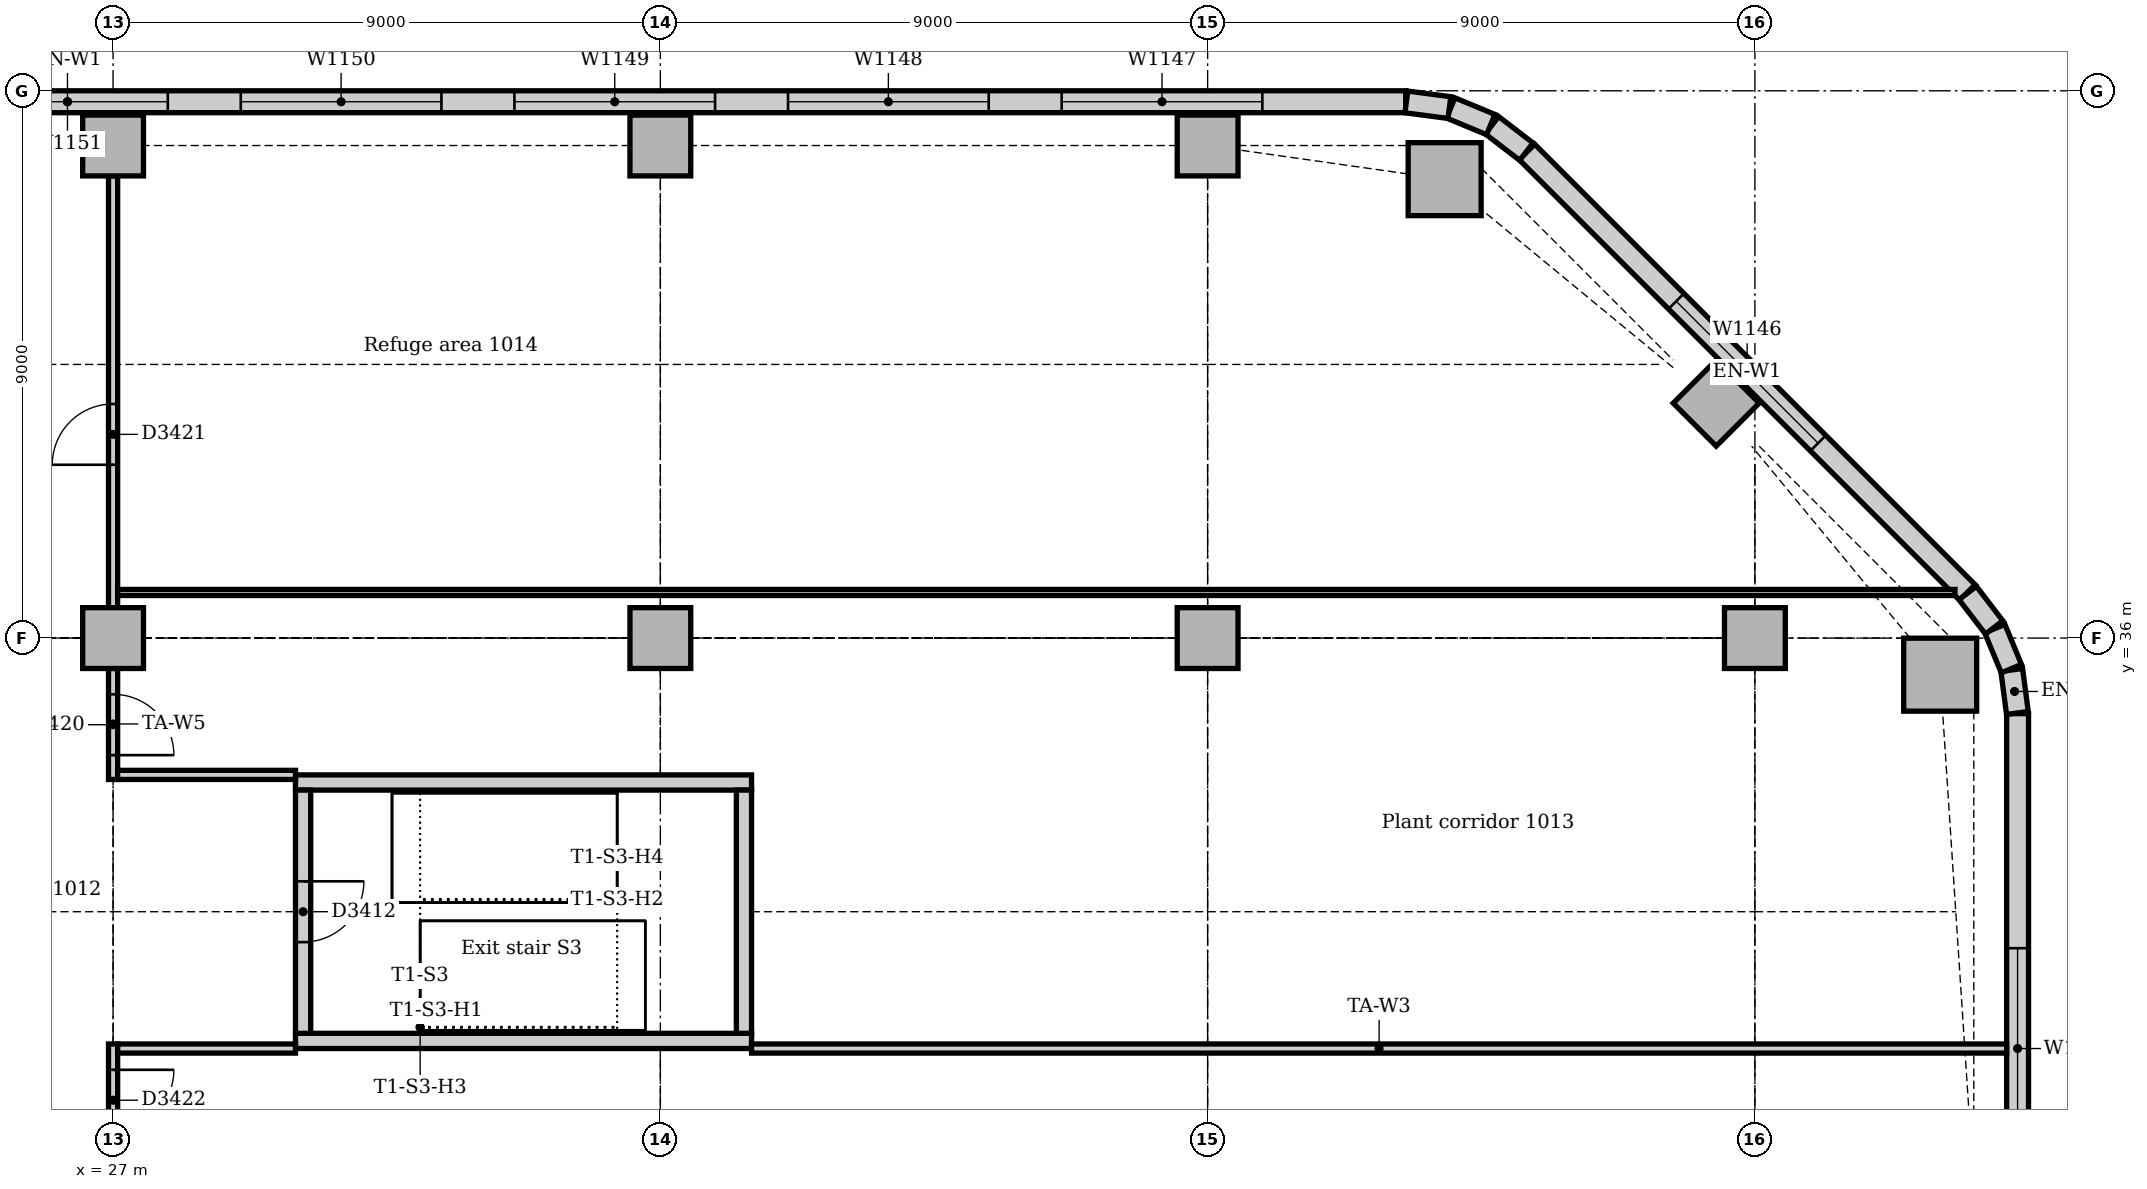
"""IFC4 building model, lengths in metres.
Left out: names, types, materials, properties, quantities, classifications, styles, units other than length and angle.
Written with IfcOpenShell. Run it as: python <this file> out.ifc"""

import sys

from ifc_helpers import new_model, si_unit, direction, frame, frame_2d, origin, origin_2d, place, context, subcontext, project, spatial, rectangle, extrude, element, fill, save


model = new_model("IFC4")
c1 = context("Model", 3, precision=1e-05, world=origin(), true_north=direction((0.0, 1.0)))
c2 = subcontext(c1, "Body", "Model", "MODEL_VIEW")
j1 = project(units=[si_unit("LENGTHUNIT", "METRE"), si_unit("PLANEANGLEUNIT", "RADIAN")], contexts=[c1])
p1 = place(None, origin())
s1 = spatial("IfcSite", under=j1, at=p1, CompositionType="ELEMENT")
p2 = place(p1, origin())
s2 = spatial("IfcBuilding", under=s1, at=p2, CompositionType="ELEMENT")
p3 = place(p2, frame((0.0, 0.0, 46.0)))
s3 = spatial("IfcBuildingStorey", under=s2, at=p3, CompositionType="ELEMENT", Elevation=46.0)
for number, where, z_axis, x_axis in (
    (1, (30.0, 29.375, 0.0), (0.0, 0.0, 1.0), (1.0, 0.0, 0.0)),
    (2, (37.5, 33.625, 0.0), (0.0, 0.0, 1.0), (-1.0, 0.0, 0.0)),
):
    element("IfcWall", number, at=place(p3, frame(where, z_axis=z_axis, x_axis=x_axis)), inside=s3, PredefinedType="SOLIDWALL", context=c2, shape_type="SweptSolid", body=[
        extrude(rectangle(XDim=7.5, YDim=0.25, at=frame_2d((3.75, 0.0))), origin(), (0.0, 0.0, 1.0), 5.0),
    ])
p4 = place(p3, frame((37.375, 29.5, 0.0), z_axis=(0.0, 0.0, 1.0), x_axis=(0.0, 1.0, 0.0)))
e3 = element("IfcWall", 3, at=p4, inside=s3, PredefinedType="SOLIDWALL", context=c2, shape_type="SweptSolid", body=[
    extrude(rectangle(XDim=4.0, YDim=0.25, at=frame_2d((2.0, 0.0))), origin(), (0.0, 0.0, 1.0), 5.0),
])
p5 = place(p3, frame((30.125, 33.5, 0.0), z_axis=(0.0, 0.0, 1.0), x_axis=(0.0, -1.0, 0.0)))
e4 = element("IfcWall", 4, at=p5, inside=s3, PredefinedType="SOLIDWALL", context=c2, shape_type="SweptSolid", body=[
    extrude(rectangle(XDim=4.0, YDim=0.25, at=frame_2d((2.0, 0.0))), origin(), (0.0, 0.0, 1.0), 5.0),
])
p6 = place(p5, frame((1.5, 0.0, 0.0)))
e5 = element("IfcOpeningElement", 5, at=p6, cuts=e4, PredefinedType="OPENING", context=c2, shape_type="SweptSolid", body=[
    extrude(rectangle(XDim=1.0, YDim=2.1, at=frame_2d((0.5, 1.05))), frame((0.0, 0.135, 0.0), z_axis=(0.0, -1.0, 0.0), x_axis=(1.0, 0.0, 0.0)), (0.0, 0.0, 1.0), 0.27),
])
for number, where, z_axis, x_axis in (
    (6, (57.047, 35.398, 0.0), (0.0, 0.0, 1.0), (1.0, 0.0, 0.0)),
    (7, (48.898, 43.547, 0.0), (0.0, 0.0, 1.0), (1.0, 0.0, 0.0)),
):
    element("IfcColumn", number, at=place(p3, frame(where, z_axis=z_axis, x_axis=x_axis)), inside=s3, PredefinedType="COLUMN", context=c2, shape_type="SweptSolid", body=[
        extrude(rectangle(XDim=1.2, YDim=1.2, at=origin_2d()), origin(), (0.0, 0.0, 1.0), 4.85),
    ])
for number, where, z_axis, x_axis in (
    (8, (53.364, 39.864, 0.0), (0.0, 0.0, 1.0), (0.707, 0.707, 0.0)),
    (9, (27.0, 44.1, 0.0), (0.0, 0.0, 1.0), (1.0, 0.0, 0.0)),
    (10, (36.0, 44.1, 0.0), (0.0, 0.0, 1.0), (1.0, 0.0, 0.0)),
    (11, (45.0, 44.1, 0.0), (0.0, 0.0, 1.0), (1.0, 0.0, 0.0)),
    (12, (27.0, 36.0, 0.0), (0.0, 0.0, 1.0), (1.0, 0.0, 0.0)),
    (13, (36.0, 36.0, 0.0), (0.0, 0.0, 1.0), (1.0, 0.0, 0.0)),
    (14, (45.0, 36.0, 0.0), (0.0, 0.0, 1.0), (1.0, 0.0, 0.0)),
    (15, (54.0, 36.0, 0.0), (0.0, 0.0, 1.0), (1.0, 0.0, 0.0)),
):
    element("IfcColumn", number, at=place(p3, frame(where, z_axis=z_axis, x_axis=x_axis)), inside=s3, PredefinedType="COLUMN", context=c2, shape_type="SweptSolid", body=[
        extrude(rectangle(XDim=1.0, YDim=1.0, at=origin_2d()), origin(), (0.0, 0.0, 1.0), 4.85),
    ])
p7 = place(p3, frame((58.32, 10.243, 0.0), z_axis=(0.0, 0.0, 1.0), x_axis=(0.0, 1.0, 0.0)))
e16 = element("IfcWall", 16, at=p7, inside=s3, PredefinedType="STANDARD", context=c2, shape_type="SweptSolid", body=[
    extrude(rectangle(XDim=24.515, YDim=0.36, at=frame_2d((12.257, 0.0))), origin(), (0.0, 0.0, 1.0), 4.85),
])
p8 = place(p7, frame((3.857, 0.0, 0.9)))
e17 = element("IfcOpeningElement", 17, at=p8, cuts=e16, PredefinedType="OPENING", context=c2, shape_type="SweptSolid", body=[
    extrude(rectangle(XDim=3.3, YDim=2.2, at=frame_2d((1.65, 1.1))), frame((0.0, 0.19, 0.0), z_axis=(0.0, -1.0, 0.0), x_axis=(1.0, 0.0, 0.0)), (0.0, 0.0, 1.0), 0.38),
])
p9 = place(p7, frame((8.757, 0.0, 0.9)))
e18 = element("IfcOpeningElement", 18, at=p9, cuts=e16, PredefinedType="OPENING", context=c2, shape_type="SweptSolid", body=[
    extrude(rectangle(XDim=1.8, YDim=2.2, at=frame_2d((0.9, 1.1))), frame((0.0, 0.19, 0.0), z_axis=(0.0, -1.0, 0.0), x_axis=(1.0, 0.0, 0.0)), (0.0, 0.0, 1.0), 0.38),
])
p10 = place(p7, frame((12.557, 0.0, 0.9)))
e19 = element("IfcOpeningElement", 19, at=p10, cuts=e16, PredefinedType="OPENING", context=c2, shape_type="SweptSolid", body=[
    extrude(rectangle(XDim=3.3, YDim=2.2, at=frame_2d((1.65, 1.1))), frame((0.0, 0.19, 0.0), z_axis=(0.0, -1.0, 0.0), x_axis=(1.0, 0.0, 0.0)), (0.0, 0.0, 1.0), 0.38),
])
p11 = place(p7, frame((17.357, 0.0, 0.9)))
e20 = element("IfcOpeningElement", 20, at=p11, cuts=e16, PredefinedType="OPENING", context=c2, shape_type="SweptSolid", body=[
    extrude(rectangle(XDim=3.3, YDim=2.2, at=frame_2d((1.65, 1.1))), frame((0.0, 0.19, 0.0), z_axis=(0.0, -1.0, 0.0), x_axis=(1.0, 0.0, 0.0)), (0.0, 0.0, 1.0), 0.38),
])
p12 = place(p3, frame((57.494, 36.751, 0.0), z_axis=(0.0, 0.0, 1.0), x_axis=(-0.707106781187, 0.707106781187, 0.0)))
e21 = element("IfcWall", 21, at=p12, inside=s3, PredefinedType="STANDARD", context=c2, shape_type="SweptSolid", body=[
    extrude(rectangle(XDim=10.243, YDim=0.36, at=frame_2d((5.121, 0.0))), origin(), (0.0, 0.0, 1.0), 4.85),
])
p13 = place(p12, frame((3.471, 0.0, 0.9)))
e22 = element("IfcOpeningElement", 22, at=p13, cuts=e21, PredefinedType="OPENING", context=c2, shape_type="SweptSolid", body=[
    extrude(rectangle(XDim=3.3, YDim=2.2, at=frame_2d((1.65, 1.1))), frame((0.0, 0.19, 0.0), z_axis=(0.0, -1.0, 0.0), x_axis=(1.0, 0.0, 0.0)), (0.0, 0.0, 1.0), 0.38),
])
p14 = place(p3, frame((48.257, 44.82, 0.0), z_axis=(0.0, 0.0, 1.0), x_axis=(-1.0, 0.0, 0.0)))
e23 = element("IfcWall", 23, at=p14, inside=s3, PredefinedType="STANDARD", context=c2, shape_type="SweptSolid", body=[
    extrude(rectangle(XDim=44.015, YDim=0.36, at=frame_2d((22.007, 0.0))), origin(), (0.0, 0.0, 1.0), 4.85),
])
p15 = place(p14, frame((2.357, 0.0, 0.9)))
e24 = element("IfcOpeningElement", 24, at=p15, cuts=e23, PredefinedType="OPENING", context=c2, shape_type="SweptSolid", body=[
    extrude(rectangle(XDim=3.3, YDim=2.2, at=frame_2d((1.65, 1.1))), frame((0.0, 0.19, 0.0), z_axis=(0.0, -1.0, 0.0), x_axis=(1.0, 0.0, 0.0)), (0.0, 0.0, 1.0), 0.38),
])
p16 = place(p14, frame((6.857, 0.0, 0.9)))
e25 = element("IfcOpeningElement", 25, at=p16, cuts=e23, PredefinedType="OPENING", context=c2, shape_type="SweptSolid", body=[
    extrude(rectangle(XDim=3.3, YDim=2.2, at=frame_2d((1.65, 1.1))), frame((0.0, 0.19, 0.0), z_axis=(0.0, -1.0, 0.0), x_axis=(1.0, 0.0, 0.0)), (0.0, 0.0, 1.0), 0.38),
])
p17 = place(p14, frame((11.357, 0.0, 0.9)))
e26 = element("IfcOpeningElement", 26, at=p17, cuts=e23, PredefinedType="OPENING", context=c2, shape_type="SweptSolid", body=[
    extrude(rectangle(XDim=3.3, YDim=2.2, at=frame_2d((1.65, 1.1))), frame((0.0, 0.19, 0.0), z_axis=(0.0, -1.0, 0.0), x_axis=(1.0, 0.0, 0.0)), (0.0, 0.0, 1.0), 0.38),
])
p18 = place(p14, frame((15.857, 0.0, 0.9)))
e27 = element("IfcOpeningElement", 27, at=p18, cuts=e23, PredefinedType="OPENING", context=c2, shape_type="SweptSolid", body=[
    extrude(rectangle(XDim=3.3, YDim=2.2, at=frame_2d((1.65, 1.1))), frame((0.0, 0.19, 0.0), z_axis=(0.0, -1.0, 0.0), x_axis=(1.0, 0.0, 0.0)), (0.0, 0.0, 1.0), 0.38),
])
p19 = place(p14, frame((20.357, 0.0, 0.9)))
e28 = element("IfcOpeningElement", 28, at=p19, cuts=e23, PredefinedType="OPENING", context=c2, shape_type="SweptSolid", body=[
    extrude(rectangle(XDim=3.3, YDim=2.2, at=frame_2d((1.65, 1.1))), frame((0.0, 0.19, 0.0), z_axis=(0.0, -1.0, 0.0), x_axis=(1.0, 0.0, 0.0)), (0.0, 0.0, 1.0), 0.38),
])
p20 = place(p14, frame((24.857, 0.0, 0.9)))
e29 = element("IfcOpeningElement", 29, at=p20, cuts=e23, PredefinedType="OPENING", context=c2, shape_type="SweptSolid", body=[
    extrude(rectangle(XDim=3.3, YDim=2.2, at=frame_2d((1.65, 1.1))), frame((0.0, 0.19, 0.0), z_axis=(0.0, -1.0, 0.0), x_axis=(1.0, 0.0, 0.0)), (0.0, 0.0, 1.0), 0.38),
])
p21 = place(p14, frame((29.357, 0.0, 0.9)))
e30 = element("IfcOpeningElement", 30, at=p21, cuts=e23, PredefinedType="OPENING", context=c2, shape_type="SweptSolid", body=[
    extrude(rectangle(XDim=3.3, YDim=2.2, at=frame_2d((1.65, 1.1))), frame((0.0, 0.19, 0.0), z_axis=(0.0, -1.0, 0.0), x_axis=(1.0, 0.0, 0.0)), (0.0, 0.0, 1.0), 0.38),
])
p22 = place(p14, frame((33.857, 0.0, 0.9)))
e31 = element("IfcOpeningElement", 31, at=p22, cuts=e23, PredefinedType="OPENING", context=c2, shape_type="SweptSolid", body=[
    extrude(rectangle(XDim=3.3, YDim=2.2, at=frame_2d((1.65, 1.1))), frame((0.0, 0.19, 0.0), z_axis=(0.0, -1.0, 0.0), x_axis=(1.0, 0.0, 0.0)), (0.0, 0.0, 1.0), 0.38),
])
p23 = place(p14, frame((38.357, 0.0, 0.9)))
e32 = element("IfcOpeningElement", 32, at=p23, cuts=e23, PredefinedType="OPENING", context=c2, shape_type="SweptSolid", body=[
    extrude(rectangle(XDim=3.3, YDim=2.2, at=frame_2d((1.65, 1.1))), frame((0.0, 0.19, 0.0), z_axis=(0.0, -1.0, 0.0), x_axis=(1.0, 0.0, 0.0)), (0.0, 0.0, 1.0), 0.38),
])
for number, where, z_axis, x_axis in (
    (33, (58.317, 34.769, 0.0), (0.0, 0.0, 1.0), (-0.131, 0.991, 0.0)),
    (34, (58.218, 35.497, 0.0), (0.0, 0.0, 1.0), (-0.383, 0.924, 0.0)),
):
    element("IfcWall", number, at=place(p3, frame(where, z_axis=z_axis, x_axis=x_axis)), inside=s3, PredefinedType="STANDARD", context=c2, shape_type="SweptSolid", body=[
        extrude(rectangle(XDim=0.713, YDim=0.36, at=frame_2d((0.356, 0.0))), origin(), (0.0, 0.0, 1.0), 4.85),
    ])
for number, where, z_axis, x_axis in (
    (35, (57.934, 36.175, 0.0), (0.0, 0.0, 1.0), (-0.609, 0.793, 0.0)),
    (36, (50.241, 44.0, 0.0), (0.0, 0.0, 1.0), (-0.793, 0.609, 0.0)),
):
    element("IfcWall", number, at=place(p3, frame(where, z_axis=z_axis, x_axis=x_axis)), inside=s3, PredefinedType="STANDARD", context=c2, shape_type="SweptSolid", body=[
        extrude(rectangle(XDim=0.713, YDim=0.36, at=frame_2d((0.357, 0.0))), origin(), (0.0, 0.0, 1.0), 4.85),
    ])
for number, where, z_axis, x_axis in (
    (37, (49.656, 44.445, 0.0), (0.0, 0.0, 1.0), (-0.924, 0.383, 0.0)),
    (38, (48.976, 44.724, 0.0), (0.0, 0.0, 1.0), (-0.991, 0.131, 0.0)),
):
    element("IfcWall", number, at=place(p3, frame(where, z_axis=z_axis, x_axis=x_axis)), inside=s3, PredefinedType="STANDARD", context=c2, shape_type="SweptSolid", body=[
        extrude(rectangle(XDim=0.713, YDim=0.36, at=frame_2d((0.356, 0.0))), origin(), (0.0, 0.0, 1.0), 4.85),
    ])
p24 = place(p3, frame((27.0, 33.675, 0.0), z_axis=(0.0, 0.0, 1.0), x_axis=(0.0, 1.0, 0.0)))
e39 = element("IfcWall", 39, at=p24, inside=s3, PredefinedType="PARTITIONING", context=c2, shape_type="SweptSolid", body=[
    extrude(rectangle(XDim=1.825, YDim=0.15, at=frame_2d((0.912, 0.0))), origin(), (0.0, 0.0, 1.0), 4.158),
])
p25 = place(p24, frame((0.4, 0.0, 0.0)))
e40 = element("IfcOpeningElement", 40, at=p25, cuts=e39, PredefinedType="OPENING", context=c2, shape_type="SweptSolid", body=[
    extrude(rectangle(XDim=1.0, YDim=2.1, at=frame_2d((0.5, 1.05))), frame((0.0, 0.085, 0.0), z_axis=(0.0, -1.0, 0.0), x_axis=(1.0, 0.0, 0.0)), (0.0, 0.0, 1.0), 0.17),
])
p26 = place(p3, frame((27.0, 36.5, 0.0), z_axis=(0.0, 0.0, 1.0), x_axis=(0.0, 1.0, 0.0)))
e41 = element("IfcWall", 41, at=p26, inside=s3, PredefinedType="PARTITIONING", context=c2, shape_type="SweptSolid", body=[
    extrude(rectangle(XDim=7.1, YDim=0.15, at=frame_2d((3.55, 0.0))), origin(), (0.0, 0.0, 1.0), 4.158),
])
p27 = place(p26, frame((2.35, 0.0, 0.0)))
e42 = element("IfcOpeningElement", 42, at=p27, cuts=e41, PredefinedType="OPENING", context=c2, shape_type="SweptSolid", body=[
    extrude(rectangle(XDim=1.0, YDim=2.1, at=frame_2d((0.5, 1.05))), frame((0.0, 0.085, 0.0), z_axis=(0.0, -1.0, 0.0), x_axis=(1.0, 0.0, 0.0)), (0.0, 0.0, 1.0), 0.17),
])
p28 = place(p3, frame((27.0, 27.5, 0.0), z_axis=(0.0, 0.0, 1.0), x_axis=(0.0, 1.0, 0.0)))
e43 = element("IfcWall", 43, at=p28, inside=s3, PredefinedType="PARTITIONING", context=c2, shape_type="SweptSolid", body=[
    extrude(rectangle(XDim=1.825, YDim=0.15, at=frame_2d((0.912, 0.0))), origin(), (0.0, 0.0, 1.0), 4.158),
])
p29 = place(p28, frame((0.4, 0.0, 0.0)))
e44 = element("IfcOpeningElement", 44, at=p29, cuts=e43, PredefinedType="OPENING", context=c2, shape_type="SweptSolid", body=[
    extrude(rectangle(XDim=1.0, YDim=2.1, at=frame_2d((0.5, 1.05))), frame((0.0, 0.085, 0.0), z_axis=(0.0, -1.0, 0.0), x_axis=(1.0, 0.0, 0.0)), (0.0, 0.0, 1.0), 0.17),
])
for number, where, z_axis, x_axis in (
    (45, (27.075, 29.25, 0.0), (0.0, 0.0, 1.0), (1.0, 0.0, 0.0)),
    (46, (27.075, 33.75, 0.0), (0.0, 0.0, 1.0), (1.0, 0.0, 0.0)),
):
    element("IfcWall", number, at=place(p3, frame(where, z_axis=z_axis, x_axis=x_axis)), inside=s3, PredefinedType="PARTITIONING", context=c2, shape_type="SweptSolid", body=[
        extrude(rectangle(XDim=2.925, YDim=0.15, at=frame_2d((1.462, 0.0))), origin(), (0.0, 0.0, 1.0), 4.85),
    ])
p30 = place(p3, frame((37.5, 29.25, 0.0), z_axis=(0.0, 0.0, 1.0), x_axis=(1.0, 0.0, 0.0)))
e47 = element("IfcWall", 47, at=p30, inside=s3, PredefinedType="PARTITIONING", context=c2, shape_type="SweptSolid", body=[
    extrude(rectangle(XDim=20.64, YDim=0.15, at=frame_2d((10.32, 0.0))), origin(), (0.0, 0.0, 1.0), 4.85),
])
p31 = place(p3, frame((27.075, 36.75, 0.0), z_axis=(0.0, 0.0, 1.0), x_axis=(1.0, 0.0, 0.0)))
e48 = element("IfcWall", 48, at=p31, inside=s3, PredefinedType="PARTITIONING", context=c2, shape_type="SweptSolid", body=[
    extrude(rectangle(XDim=30.216, YDim=0.1, at=frame_2d((15.108, 0.0))), origin(), (0.0, 0.0, 1.0), 4.85),
])
p32 = place(p11, origin())
e49 = element("IfcWindow", 49, at=p32, inside=s3, PartitioningType="SINGLE_PANEL", PredefinedType="WINDOW", context=c2, shape_type="SweptSolid", body=[
    extrude(rectangle(XDim=3.3, YDim=2.2, at=frame_2d((1.65, 1.1))), frame((0.0, 0.13, 0.0), z_axis=(0.0, -1.0, 0.0), x_axis=(1.0, 0.0, 0.0)), (0.0, 0.0, 1.0), 0.06),
])
fill(e20, e49)
p33 = place(p13, origin())
e50 = element("IfcWindow", 50, at=p33, inside=s3, PartitioningType="SINGLE_PANEL", PredefinedType="WINDOW", context=c2, shape_type="SweptSolid", body=[
    extrude(rectangle(XDim=3.3, YDim=2.2, at=frame_2d((1.65, 1.1))), frame((0.0, 0.13, 0.0), z_axis=(0.0, -1.0, 0.0), x_axis=(1.0, 0.0, 0.0)), (0.0, 0.0, 1.0), 0.06),
])
fill(e22, e50)
p34 = place(p15, origin())
e51 = element("IfcWindow", 51, at=p34, inside=s3, PartitioningType="SINGLE_PANEL", PredefinedType="WINDOW", context=c2, shape_type="SweptSolid", body=[
    extrude(rectangle(XDim=3.3, YDim=2.2, at=frame_2d((1.65, 1.1))), frame((0.0, 0.13, 0.0), z_axis=(0.0, -1.0, 0.0), x_axis=(1.0, 0.0, 0.0)), (0.0, 0.0, 1.0), 0.06),
])
fill(e24, e51)
p35 = place(p16, origin())
e52 = element("IfcWindow", 52, at=p35, inside=s3, PartitioningType="SINGLE_PANEL", PredefinedType="WINDOW", context=c2, shape_type="SweptSolid", body=[
    extrude(rectangle(XDim=3.3, YDim=2.2, at=frame_2d((1.65, 1.1))), frame((0.0, 0.13, 0.0), z_axis=(0.0, -1.0, 0.0), x_axis=(1.0, 0.0, 0.0)), (0.0, 0.0, 1.0), 0.06),
])
fill(e25, e52)
p36 = place(p17, origin())
e53 = element("IfcWindow", 53, at=p36, inside=s3, PartitioningType="SINGLE_PANEL", PredefinedType="WINDOW", context=c2, shape_type="SweptSolid", body=[
    extrude(rectangle(XDim=3.3, YDim=2.2, at=frame_2d((1.65, 1.1))), frame((0.0, 0.13, 0.0), z_axis=(0.0, -1.0, 0.0), x_axis=(1.0, 0.0, 0.0)), (0.0, 0.0, 1.0), 0.06),
])
fill(e26, e53)
p37 = place(p18, origin())
e54 = element("IfcWindow", 54, at=p37, inside=s3, PartitioningType="SINGLE_PANEL", PredefinedType="WINDOW", context=c2, shape_type="SweptSolid", body=[
    extrude(rectangle(XDim=3.3, YDim=2.2, at=frame_2d((1.65, 1.1))), frame((0.0, 0.13, 0.0), z_axis=(0.0, -1.0, 0.0), x_axis=(1.0, 0.0, 0.0)), (0.0, 0.0, 1.0), 0.06),
])
fill(e27, e54)
p38 = place(p19, origin())
e55 = element("IfcWindow", 55, at=p38, inside=s3, PartitioningType="SINGLE_PANEL", PredefinedType="WINDOW", context=c2, shape_type="SweptSolid", body=[
    extrude(rectangle(XDim=3.3, YDim=2.2, at=frame_2d((1.65, 1.1))), frame((0.0, 0.13, 0.0), z_axis=(0.0, -1.0, 0.0), x_axis=(1.0, 0.0, 0.0)), (0.0, 0.0, 1.0), 0.06),
])
fill(e28, e55)
p39 = place(p6, origin())
e56 = element("IfcDoor", 56, at=p39, inside=s3, OperationType="SINGLE_SWING_LEFT", PredefinedType="DOOR", context=c2, shape_type="SweptSolid", body=[
    extrude(rectangle(XDim=1.0, YDim=2.1, at=frame_2d((0.5, 1.05))), frame((0.0, 0.025, 0.0), z_axis=(0.0, -1.0, 0.0), x_axis=(1.0, 0.0, 0.0)), (0.0, 0.0, 1.0), 0.05),
])
fill(e5, e56)
p40 = place(p25, frame((1.0, 0.0, 0.0), z_axis=(0.0, 0.0, 1.0), x_axis=(-1.0, 0.0, 0.0)))
e57 = element("IfcDoor", 57, at=p40, inside=s3, OperationType="SINGLE_SWING_RIGHT", PredefinedType="DOOR", context=c2, shape_type="SweptSolid", body=[
    extrude(rectangle(XDim=1.0, YDim=2.1, at=frame_2d((0.5, 1.05))), frame((0.0, 0.025, 0.0), z_axis=(0.0, -1.0, 0.0), x_axis=(1.0, 0.0, 0.0)), (0.0, 0.0, 1.0), 0.05),
])
fill(e40, e57)
p41 = place(p27, origin())
e58 = element("IfcDoor", 58, at=p41, inside=s3, OperationType="SINGLE_SWING_LEFT", PredefinedType="DOOR", context=c2, shape_type="SweptSolid", body=[
    extrude(rectangle(XDim=1.0, YDim=2.1, at=frame_2d((0.5, 1.05))), frame((0.0, 0.025, 0.0), z_axis=(0.0, -1.0, 0.0), x_axis=(1.0, 0.0, 0.0)), (0.0, 0.0, 1.0), 0.05),
])
fill(e42, e58)
p42 = place(p29, frame((1.0, 0.0, 0.0), z_axis=(0.0, 0.0, 1.0), x_axis=(-1.0, 0.0, 0.0)))
e59 = element("IfcDoor", 59, at=p42, inside=s3, OperationType="SINGLE_SWING_LEFT", PredefinedType="DOOR", context=c2, shape_type="SweptSolid", body=[
    extrude(rectangle(XDim=1.0, YDim=2.1, at=frame_2d((0.5, 1.05))), frame((0.0, 0.025, 0.0), z_axis=(0.0, -1.0, 0.0), x_axis=(1.0, 0.0, 0.0)), (0.0, 0.0, 1.0), 0.05),
])
fill(e44, e59)
save(model, sys.argv[1])
